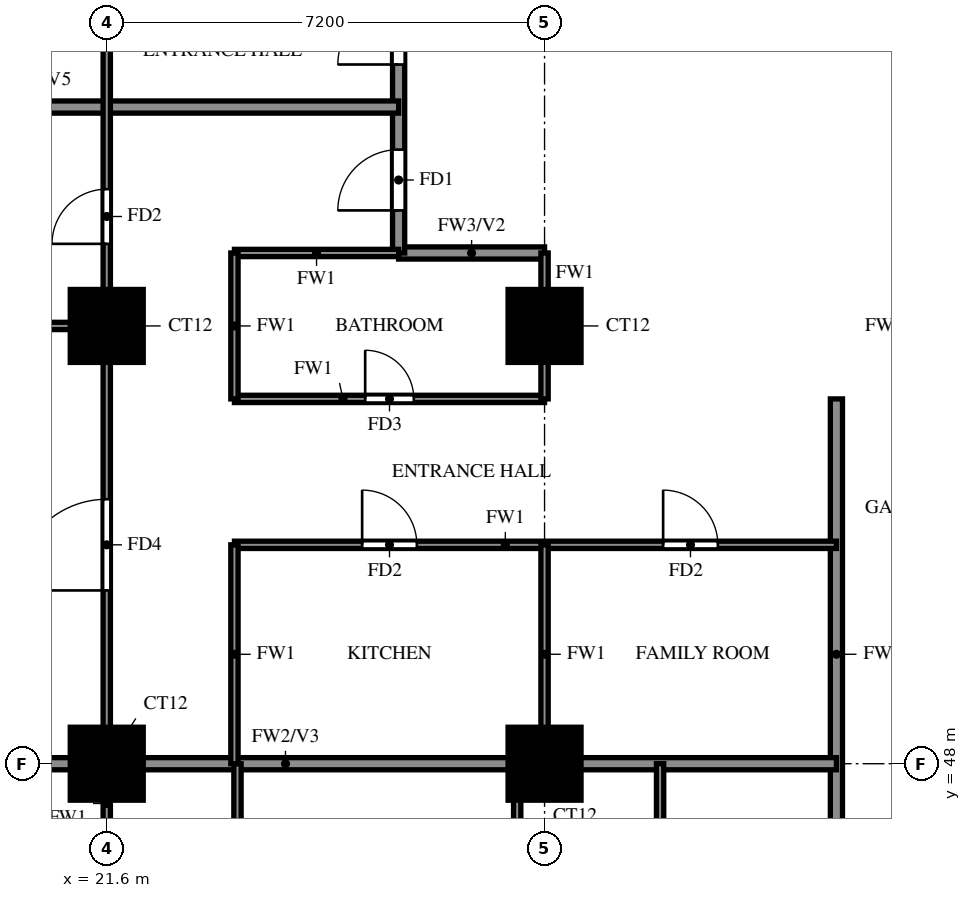
"""IFC4 building model, lengths in metres.
Left out: names, types, materials, properties, quantities, classifications, styles, units other than length and angle.
Written with IfcOpenShell. Run it as: python <this file> out.ifc"""

import sys

from ifc_helpers import new_model, si_unit, direction, frame, frame_2d, origin, origin_2d, place, context, subcontext, project, spatial, rectangle, extrude, source, transform, mapped, element, fill, save


model = new_model("IFC4")
c1 = context("Model", 3, precision=1e-05, world=origin(), true_north=direction((0.0, 1.0)))
c2 = subcontext(c1, "Body", "Model", "MODEL_VIEW")
j1 = project(units=[si_unit("LENGTHUNIT", "METRE"), si_unit("PLANEANGLEUNIT", "RADIAN")], contexts=[c1])
p1 = place(None, origin())
s1 = spatial("IfcSite", under=j1, at=p1, CompositionType="ELEMENT")
p2 = place(p1, origin())
s2 = spatial("IfcBuilding", under=s1, at=p2, CompositionType="ELEMENT")
p3 = place(p2, frame((0.0, 0.0, 97.0)))
s3 = spatial("IfcBuildingStorey", under=s2, at=p3, CompositionType="ELEMENT", Elevation=97.0)
m1 = source(origin(), c2, "Body", "SweptSolid", [
    extrude(rectangle(XDim=1.2, YDim=1.2, at=origin_2d()), origin(), (0.0, 0.0, 1.0), 3.18),
])
for number, where, z_axis, x_axis in (
    (1, (21.6, 48.0, 0.0), (0.0, 0.0, 1.0), (1.0, 0.0, 0.0)),
    (2, (28.8, 48.0, 0.0), (0.0, 0.0, 1.0), (1.0, 0.0, 0.0)),
    (3, (21.6, 55.2, 0.0), (0.0, 0.0, 1.0), (1.0, 0.0, 0.0)),
    (4, (28.8, 55.2, 0.0), (0.0, 0.0, 1.0), (1.0, 0.0, 0.0)),
):
    element("IfcColumn", number, at=place(p3, frame(where, z_axis=z_axis, x_axis=x_axis)), inside=s3, PredefinedType="COLUMN", context=c2, shape_type="MappedRepresentation", body=[
        mapped(m1, transform((0.0, 0.0, 0.0))),
    ])
p4 = place(p3, frame((26.4, 56.4, 0.0), z_axis=(0.0, 0.0, 1.0), x_axis=(1.0, 0.0, 0.0)))
e5 = element("IfcWall", 5, at=p4, inside=s3, PredefinedType="SOLIDWALL", context=c2, shape_type="SweptSolid", body=[
    extrude(rectangle(XDim=2.4, YDim=0.2, at=frame_2d((1.2, 0.0))), origin(), (0.0, 0.0, 1.0), 3.18),
])
p5 = place(p3, frame((26.4, 56.4, 0.0), z_axis=(0.0, 0.0, 1.0), x_axis=(0.0, 1.0, 0.0)))
e6 = element("IfcWall", 6, at=p5, inside=s3, PredefinedType="SOLIDWALL", context=c2, shape_type="SweptSolid", body=[
    extrude(rectangle(XDim=9.6, YDim=0.2, at=frame_2d((4.8, 0.0))), origin(), (0.0, 0.0, 1.0), 3.18),
])
p6 = place(p5, frame((0.7, 0.0, 0.0)))
e7 = element("IfcOpeningElement", 7, at=p6, cuts=e6, PredefinedType="OPENING", context=c2, shape_type="SweptSolid", body=[
    extrude(rectangle(XDim=1.0, YDim=2.1, at=frame_2d((0.5, 1.05))), frame((0.0, 0.11, 0.0), z_axis=(0.0, -1.0, 0.0), x_axis=(1.0, 0.0, 0.0)), (0.0, 0.0, 1.0), 0.22),
])
p7 = place(p5, frame((3.1, 0.0, 0.0)))
e8 = element("IfcOpeningElement", 8, at=p7, cuts=e6, PredefinedType="OPENING", context=c2, shape_type="SweptSolid", body=[
    extrude(rectangle(XDim=1.0, YDim=2.1, at=frame_2d((0.5, 1.05))), frame((0.0, 0.11, 0.0), z_axis=(0.0, -1.0, 0.0), x_axis=(1.0, 0.0, 0.0)), (0.0, 0.0, 1.0), 0.22),
])
p8 = place(p3, frame((33.6, 45.6, 0.0), z_axis=(0.0, 0.0, 1.0), x_axis=(0.0, 1.0, 0.0)))
e9 = element("IfcWall", 9, at=p8, inside=s3, PredefinedType="SOLIDWALL", context=c2, shape_type="SweptSolid", body=[
    extrude(rectangle(XDim=8.4, YDim=0.2, at=frame_2d((4.2, 0.0))), origin(), (0.0, 0.0, 1.0), 3.18),
])
p9 = place(p3, frame((14.525, 48.0, 0.0), z_axis=(0.0, 0.0, 1.0), x_axis=(1.0, 0.0, 0.0)))
e10 = element("IfcWall", 10, at=p9, inside=s3, PredefinedType="SOLIDWALL", context=c2, shape_type="SweptSolid", body=[
    extrude(rectangle(XDim=19.075, YDim=0.2, at=frame_2d((9.538, 0.0))), origin(), (0.0, 0.0, 1.0), 3.18),
])
p10 = place(p3, frame((14.525, 58.8, 0.0), z_axis=(0.0, 0.0, 1.0), x_axis=(1.0, 0.0, 0.0)))
e11 = element("IfcWall", 11, at=p10, inside=s3, PredefinedType="SOLIDWALL", context=c2, shape_type="SweptSolid", body=[
    extrude(rectangle(XDim=11.875, YDim=0.2, at=frame_2d((5.938, 0.0))), origin(), (0.0, 0.0, 1.0), 2.28),
])
p11 = place(p3, frame((23.7, 51.6, 0.0), z_axis=(0.0, 0.0, 1.0), x_axis=(1.0, 0.0, 0.0)))
e12 = element("IfcWall", 12, at=p11, inside=s3, PredefinedType="PARTITIONING", context=c2, shape_type="SweptSolid", body=[
    extrude(rectangle(XDim=9.9, YDim=0.12, at=frame_2d((4.95, 0.0))), origin(), (0.0, 0.0, 1.0), 3.18),
])
p12 = place(p11, frame((2.1, 0.0, 0.0)))
e13 = element("IfcOpeningElement", 13, at=p12, cuts=e12, PredefinedType="OPENING", context=c2, shape_type="SweptSolid", body=[
    extrude(rectangle(XDim=0.9, YDim=2.1, at=frame_2d((0.45, 1.05))), frame((0.0, 0.07, 0.0), z_axis=(0.0, -1.0, 0.0), x_axis=(1.0, 0.0, 0.0)), (0.0, 0.0, 1.0), 0.14),
])
p13 = place(p11, frame((7.05, 0.0, 0.0)))
e14 = element("IfcOpeningElement", 14, at=p13, cuts=e12, PredefinedType="OPENING", context=c2, shape_type="SweptSolid", body=[
    extrude(rectangle(XDim=0.9, YDim=2.1, at=frame_2d((0.45, 1.05))), frame((0.0, 0.07, 0.0), z_axis=(0.0, -1.0, 0.0), x_axis=(1.0, 0.0, 0.0)), (0.0, 0.0, 1.0), 0.14),
])
p14 = place(p3, frame((23.7, 54.0, 0.0), z_axis=(0.0, 0.0, 1.0), x_axis=(1.0, 0.0, 0.0)))
e15 = element("IfcWall", 15, at=p14, inside=s3, PredefinedType="PARTITIONING", context=c2, shape_type="SweptSolid", body=[
    extrude(rectangle(XDim=5.1, YDim=0.12, at=frame_2d((2.55, 0.0))), origin(), (0.0, 0.0, 1.0), 3.18),
])
p15 = place(p14, frame((2.15, 0.0, 0.0)))
e16 = element("IfcOpeningElement", 16, at=p15, cuts=e15, PredefinedType="OPENING", context=c2, shape_type="SweptSolid", body=[
    extrude(rectangle(XDim=0.8, YDim=2.1, at=frame_2d((0.4, 1.05))), frame((0.0, 0.07, 0.0), z_axis=(0.0, -1.0, 0.0), x_axis=(1.0, 0.0, 0.0)), (0.0, 0.0, 1.0), 0.14),
])
p16 = place(p3, frame((14.525, 55.2, 0.0), z_axis=(0.0, 0.0, 1.0), x_axis=(1.0, 0.0, 0.0)))
e17 = element("IfcWall", 17, at=p16, inside=s3, PredefinedType="PARTITIONING", context=c2, shape_type="SweptSolid", body=[
    extrude(rectangle(XDim=7.075, YDim=0.12, at=frame_2d((3.538, 0.0))), origin(), (0.0, 0.0, 1.0), 3.18),
])
p17 = place(p3, frame((23.7, 56.4, 0.0), z_axis=(0.0, 0.0, 1.0), x_axis=(1.0, 0.0, 0.0)))
e18 = element("IfcWall", 18, at=p17, inside=s3, PredefinedType="PARTITIONING", context=c2, shape_type="SweptSolid", body=[
    extrude(rectangle(XDim=2.7, YDim=0.12, at=frame_2d((1.35, 0.0))), origin(), (0.0, 0.0, 1.0), 3.18),
])
p18 = place(p3, frame((21.6, 33.725, 0.0), z_axis=(0.0, 0.0, 1.0), x_axis=(0.0, 1.0, 0.0)))
e19 = element("IfcWall", 19, at=p18, inside=s3, PredefinedType="PARTITIONING", context=c2, shape_type="SweptSolid", body=[
    extrude(rectangle(XDim=28.675, YDim=0.12, at=frame_2d((14.337, 0.0))), origin(), (0.0, 0.0, 1.0), 3.18),
])
p19 = place(p18, frame((7.775, 0.0, 0.0)))
e20 = element("IfcOpeningElement", 20, at=p19, cuts=e19, PredefinedType="OPENING", context=c2, shape_type="SweptSolid", body=[
    extrude(rectangle(XDim=0.9, YDim=2.1, at=frame_2d((0.45, 1.05))), frame((0.0, 0.07, 0.0), z_axis=(0.0, -1.0, 0.0), x_axis=(1.0, 0.0, 0.0)), (0.0, 0.0, 1.0), 0.14),
])
p20 = place(p18, frame((17.125, 0.0, 0.0)))
e21 = element("IfcOpeningElement", 21, at=p20, cuts=e19, PredefinedType="OPENING", context=c2, shape_type="SweptSolid", body=[
    extrude(rectangle(XDim=1.5, YDim=2.1, at=frame_2d((0.75, 1.05))), frame((0.0, 0.07, 0.0), z_axis=(0.0, -1.0, 0.0), x_axis=(1.0, 0.0, 0.0)), (0.0, 0.0, 1.0), 0.14),
])
p21 = place(p18, frame((22.825, 0.0, 0.0)))
e22 = element("IfcOpeningElement", 22, at=p21, cuts=e19, PredefinedType="OPENING", context=c2, shape_type="SweptSolid", body=[
    extrude(rectangle(XDim=0.9, YDim=2.1, at=frame_2d((0.45, 1.05))), frame((0.0, 0.07, 0.0), z_axis=(0.0, -1.0, 0.0), x_axis=(1.0, 0.0, 0.0)), (0.0, 0.0, 1.0), 0.14),
])
p22 = place(p18, frame((26.425, 0.0, 0.0)))
e23 = element("IfcOpeningElement", 23, at=p22, cuts=e19, PredefinedType="OPENING", context=c2, shape_type="SweptSolid", body=[
    extrude(rectangle(XDim=0.9, YDim=2.1, at=frame_2d((0.45, 1.05))), frame((0.0, 0.07, 0.0), z_axis=(0.0, -1.0, 0.0), x_axis=(1.0, 0.0, 0.0)), (0.0, 0.0, 1.0), 0.14),
])
p23 = place(p3, frame((23.7, 48.0, 0.0), z_axis=(0.0, 0.0, 1.0), x_axis=(0.0, 1.0, 0.0)))
e24 = element("IfcWall", 24, at=p23, inside=s3, PredefinedType="PARTITIONING", context=c2, shape_type="SweptSolid", body=[
    extrude(rectangle(XDim=3.6, YDim=0.12, at=frame_2d((1.8, 0.0))), origin(), (0.0, 0.0, 1.0), 3.18),
])
p24 = place(p3, frame((23.7, 54.0, 0.0), z_axis=(0.0, 0.0, 1.0), x_axis=(0.0, 1.0, 0.0)))
e25 = element("IfcWall", 25, at=p24, inside=s3, PredefinedType="PARTITIONING", context=c2, shape_type="SweptSolid", body=[
    extrude(rectangle(XDim=2.4, YDim=0.12, at=frame_2d((1.2, 0.0))), origin(), (0.0, 0.0, 1.0), 3.18),
])
for number, where, z_axis, x_axis in (
    (26, (23.75, 42.9, 0.0), (0.0, 0.0, 1.0), (0.0, 1.0, 0.0)),
    (27, (28.35, 42.9, 0.0), (0.0, 0.0, 1.0), (0.0, 1.0, 0.0)),
):
    element("IfcWall", number, at=place(p3, frame(where, z_axis=z_axis, x_axis=x_axis)), inside=s3, PredefinedType="PARTITIONING", context=c2, shape_type="SweptSolid", body=[
        extrude(rectangle(XDim=5.1, YDim=0.12, at=frame_2d((2.55, 0.0))), origin(), (0.0, 0.0, 1.0), 3.18),
    ])
p25 = place(p3, frame((28.8, 48.0, 0.0), z_axis=(0.0, 0.0, 1.0), x_axis=(0.0, 1.0, 0.0)))
e28 = element("IfcWall", 28, at=p25, inside=s3, PredefinedType="PARTITIONING", context=c2, shape_type="SweptSolid", body=[
    extrude(rectangle(XDim=3.6, YDim=0.12, at=frame_2d((1.8, 0.0))), origin(), (0.0, 0.0, 1.0), 3.18),
])
p26 = place(p3, frame((28.8, 54.0, 0.0), z_axis=(0.0, 0.0, 1.0), x_axis=(0.0, 1.0, 0.0)))
e29 = element("IfcWall", 29, at=p26, inside=s3, PredefinedType="PARTITIONING", context=c2, shape_type="SweptSolid", body=[
    extrude(rectangle(XDim=2.4, YDim=0.12, at=frame_2d((1.2, 0.0))), origin(), (0.0, 0.0, 1.0), 3.18),
])
p27 = place(p3, frame((30.7, 42.9, 0.0), z_axis=(0.0, 0.0, 1.0), x_axis=(0.0, 1.0, 0.0)))
e30 = element("IfcWall", 30, at=p27, inside=s3, PredefinedType="PARTITIONING", context=c2, shape_type="SweptSolid", body=[
    extrude(rectangle(XDim=5.1, YDim=0.12, at=frame_2d((2.55, 0.0))), origin(), (0.0, 0.0, 1.0), 3.18),
])
p28 = place(p6, origin())
e31 = element("IfcDoor", 31, at=p28, inside=s3, OperationType="SINGLE_SWING_LEFT", PredefinedType="DOOR", context=c2, shape_type="SweptSolid", body=[
    extrude(rectangle(XDim=1.0, YDim=2.1, at=frame_2d((0.5, 1.05))), frame((0.0, 0.025, 0.0), z_axis=(0.0, -1.0, 0.0), x_axis=(1.0, 0.0, 0.0)), (0.0, 0.0, 1.0), 0.05),
])
fill(e7, e31)
p29 = place(p20, origin())
e32 = element("IfcDoor", 32, at=p29, inside=s3, OperationType="SINGLE_SWING_RIGHT", PredefinedType="DOOR", context=c2, shape_type="SweptSolid", body=[
    extrude(rectangle(XDim=1.5, YDim=2.1, at=frame_2d((0.75, 1.05))), frame((0.0, 0.025, 0.0), z_axis=(0.0, -1.0, 0.0), x_axis=(1.0, 0.0, 0.0)), (0.0, 0.0, 1.0), 0.05),
])
fill(e21, e32)
p30 = place(p21, origin())
e33 = element("IfcDoor", 33, at=p30, inside=s3, OperationType="SINGLE_SWING_LEFT", PredefinedType="DOOR", context=c2, shape_type="SweptSolid", body=[
    extrude(rectangle(XDim=0.9, YDim=2.1, at=frame_2d((0.45, 1.05))), frame((0.0, 0.025, 0.0), z_axis=(0.0, -1.0, 0.0), x_axis=(1.0, 0.0, 0.0)), (0.0, 0.0, 1.0), 0.05),
])
fill(e22, e33)
p31 = place(p12, origin())
e34 = element("IfcDoor", 34, at=p31, inside=s3, OperationType="SINGLE_SWING_LEFT", PredefinedType="DOOR", context=c2, shape_type="SweptSolid", body=[
    extrude(rectangle(XDim=0.9, YDim=2.1, at=frame_2d((0.45, 1.05))), frame((0.0, 0.025, 0.0), z_axis=(0.0, -1.0, 0.0), x_axis=(1.0, 0.0, 0.0)), (0.0, 0.0, 1.0), 0.05),
])
fill(e13, e34)
p32 = place(p15, origin())
e35 = element("IfcDoor", 35, at=p32, inside=s3, OperationType="SINGLE_SWING_RIGHT", PredefinedType="DOOR", context=c2, shape_type="SweptSolid", body=[
    extrude(rectangle(XDim=0.8, YDim=2.1, at=frame_2d((0.4, 1.05))), frame((0.0, 0.025, 0.0), z_axis=(0.0, -1.0, 0.0), x_axis=(1.0, 0.0, 0.0)), (0.0, 0.0, 1.0), 0.05),
])
fill(e16, e35)
p33 = place(p13, origin())
e36 = element("IfcDoor", 36, at=p33, inside=s3, OperationType="SINGLE_SWING_LEFT", PredefinedType="DOOR", context=c2, shape_type="SweptSolid", body=[
    extrude(rectangle(XDim=0.9, YDim=2.1, at=frame_2d((0.45, 1.05))), frame((0.0, 0.025, 0.0), z_axis=(0.0, -1.0, 0.0), x_axis=(1.0, 0.0, 0.0)), (0.0, 0.0, 1.0), 0.05),
])
fill(e14, e36)
p34 = place(p7, origin())
e37 = element("IfcDoor", 37, at=p34, inside=s3, OperationType="SINGLE_SWING_LEFT", PredefinedType="DOOR", context=c2, shape_type="SweptSolid", body=[
    extrude(rectangle(XDim=1.0, YDim=2.1, at=frame_2d((0.5, 1.05))), frame((0.0, 0.025, 0.0), z_axis=(0.0, -1.0, 0.0), x_axis=(1.0, 0.0, 0.0)), (0.0, 0.0, 1.0), 0.05),
])
fill(e8, e37)
save(model, sys.argv[1])
